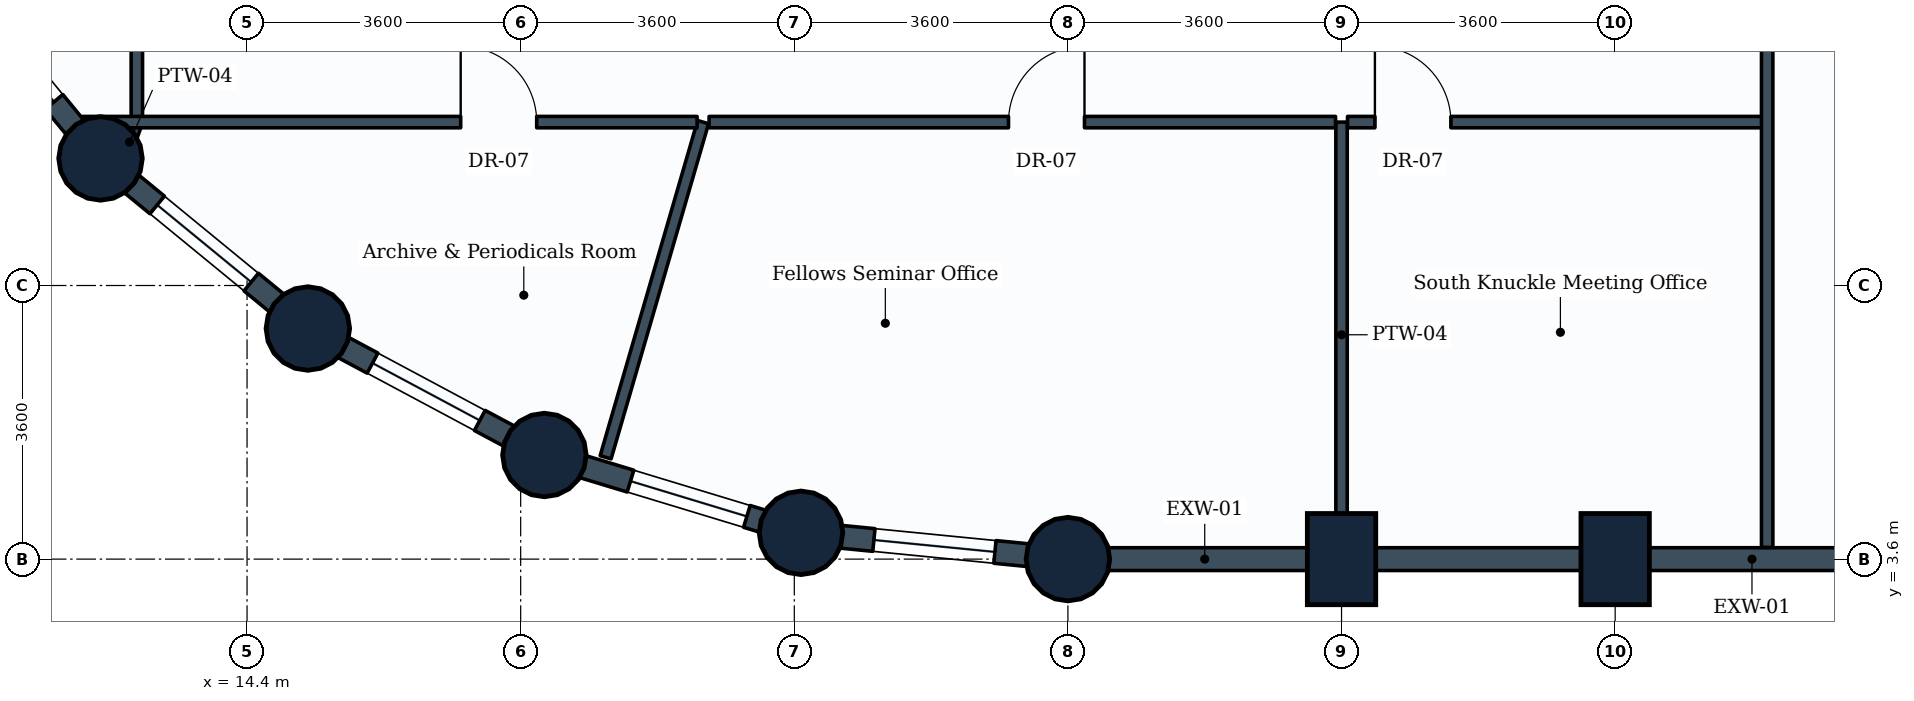
"""IFC4 building model, lengths in metres.
Left out: names, types, materials, properties, quantities, classifications, styles, units other than length and angle.
Written with IfcOpenShell. Run it as: python <this file> out.ifc"""

import sys

from ifc_helpers import new_model, si_unit, direction, frame, frame_2d, origin, origin_2d, place, context, subcontext, project, spatial, rectangle, circle, extrude, element, fill, save


model = new_model("IFC4")
c1 = context("Model", 3, precision=1e-05, world=origin(), true_north=direction((0.0, 1.0)))
c2 = subcontext(c1, "Body", "Model", "MODEL_VIEW")
j1 = project(units=[si_unit("LENGTHUNIT", "METRE"), si_unit("PLANEANGLEUNIT", "RADIAN")], contexts=[c1])
p1 = place(None, origin())
s1 = spatial("IfcSite", under=j1, at=p1, CompositionType="ELEMENT")
p2 = place(p1, origin())
s2 = spatial("IfcBuilding", under=s1, at=p2, CompositionType="ELEMENT")
p3 = place(p2, frame((0.0, 0.0, 35.7)))
s3 = spatial("IfcBuildingStorey", under=s2, at=p3, CompositionType="ELEMENT", Elevation=35.7)
for number, where, z_axis, x_axis in (
    (1, (12.472, 8.872, 0.0), (0.0, 0.0, 1.0), (1.0, 0.0, 0.0)),
    (2, (15.2, 6.634, 0.0), (0.0, 0.0, 1.0), (1.0, 0.0, 0.0)),
    (3, (18.312, 4.97, 0.0), (0.0, 0.0, 1.0), (1.0, 0.0, 0.0)),
    (4, (21.688, 3.946, 0.0), (0.0, 0.0, 1.0), (1.0, 0.0, 0.0)),
    (5, (25.2, 3.6, 0.0), (0.0, 0.0, 1.0), (1.0, 0.0, 0.0)),
):
    element("IfcColumn", number, at=place(p3, frame(where, z_axis=z_axis, x_axis=x_axis)), inside=s3, PredefinedType="COLUMN", context=c2, shape_type="SweptSolid", body=[
        extrude(circle(Radius=0.55, at=origin_2d()), origin(), (0.0, 0.0, 1.0), 3.9),
    ])
for number, where, z_axis, x_axis in (
    (6, (28.8, 3.6, 0.0), (0.0, 0.0, 1.0), (1.0, 0.0, 0.0)),
    (7, (32.4, 3.6, 0.0), (0.0, 0.0, 1.0), (1.0, 0.0, 0.0)),
):
    element("IfcColumn", number, at=place(p3, frame(where, z_axis=z_axis, x_axis=x_axis)), inside=s3, PredefinedType="COLUMN", context=c2, shape_type="SweptSolid", body=[
        extrude(rectangle(XDim=0.9, YDim=1.2, at=origin_2d()), origin(), (0.0, 0.0, 1.0), 3.9),
    ])
p4 = place(p3, frame((28.8, 3.6, 0.0), z_axis=(0.0, 0.0, 1.0), x_axis=(-1.0, 0.0, 0.0)))
e8 = element("IfcWall", 8, at=p4, inside=s3, PredefinedType="STANDARD", context=c2, shape_type="SweptSolid", body=[
    extrude(rectangle(XDim=3.6, YDim=0.3, at=frame_2d((1.8, 0.0))), origin(), (0.0, 0.0, 1.0), 2.93),
])
p5 = place(p3, frame((32.4, 3.6, 0.0), z_axis=(0.0, 0.0, 1.0), x_axis=(-1.0, 0.0, 0.0)))
e9 = element("IfcWall", 9, at=p5, inside=s3, PredefinedType="STANDARD", context=c2, shape_type="SweptSolid", body=[
    extrude(rectangle(XDim=3.6, YDim=0.3, at=frame_2d((1.8, 0.0))), origin(), (0.0, 0.0, 1.0), 2.93),
])
p6 = place(p3, frame((36.0, 3.6, 0.0), z_axis=(0.0, 0.0, 1.0), x_axis=(-1.0, 0.0, 0.0)))
e10 = element("IfcWall", 10, at=p6, inside=s3, PredefinedType="STANDARD", context=c2, shape_type="SweptSolid", body=[
    extrude(rectangle(XDim=3.6, YDim=0.3, at=frame_2d((1.8, 0.0))), origin(), (0.0, 0.0, 1.0), 2.93),
])
p7 = place(p3, frame((12.472, 8.872, 0.0), z_axis=(0.0, 0.0, 1.0), x_axis=(-0.634258295121, 0.773121216285, 0.0)))
e11 = element("IfcWall", 11, at=p7, inside=s3, PredefinedType="STANDARD", context=c2, shape_type="SweptSolid", body=[
    extrude(rectangle(XDim=3.529, YDim=0.3, at=frame_2d((1.764, 0.0))), origin(), (0.0, 0.0, 1.0), 2.93),
])
p8 = place(p7, frame((0.964, 0.0, 0.85)))
e12 = element("IfcOpeningElement", 12, at=p8, cuts=e11, PredefinedType="OPENING", context=c2, shape_type="SweptSolid", body=[
    extrude(rectangle(XDim=1.6, YDim=1.35, at=frame_2d((0.8, 0.675))), frame((0.0, 0.16, 0.0), z_axis=(0.0, -1.0, 0.0), x_axis=(1.0, 0.0, 0.0)), (0.0, 0.0, 1.0), 0.32),
])
p9 = place(p3, frame((15.2, 6.634, 0.0), z_axis=(0.0, 0.0, 1.0), x_axis=(-0.773121216285, 0.634258295121, 0.0)))
e13 = element("IfcWall", 13, at=p9, inside=s3, PredefinedType="STANDARD", context=c2, shape_type="SweptSolid", body=[
    extrude(rectangle(XDim=3.529, YDim=0.3, at=frame_2d((1.764, 0.0))), origin(), (0.0, 0.0, 1.0), 2.93),
])
p10 = place(p9, frame((0.964, 0.0, 0.85)))
e14 = element("IfcOpeningElement", 14, at=p10, cuts=e13, PredefinedType="OPENING", context=c2, shape_type="SweptSolid", body=[
    extrude(rectangle(XDim=1.6, YDim=1.35, at=frame_2d((0.8, 0.675))), frame((0.0, 0.16, 0.0), z_axis=(0.0, -1.0, 0.0), x_axis=(1.0, 0.0, 0.0)), (0.0, 0.0, 1.0), 0.32),
])
p11 = place(p3, frame((18.312, 4.97, 0.0), z_axis=(0.0, 0.0, 1.0), x_axis=(-0.881846862014, 0.471535907389, 0.0)))
e15 = element("IfcWall", 15, at=p11, inside=s3, PredefinedType="STANDARD", context=c2, shape_type="SweptSolid", body=[
    extrude(rectangle(XDim=3.529, YDim=0.3, at=frame_2d((1.765, 0.0))), origin(), (0.0, 0.0, 1.0), 2.93),
])
p12 = place(p11, frame((0.964, 0.0, 0.85)))
e16 = element("IfcOpeningElement", 16, at=p12, cuts=e15, PredefinedType="OPENING", context=c2, shape_type="SweptSolid", body=[
    extrude(rectangle(XDim=1.6, YDim=1.35, at=frame_2d((0.8, 0.675))), frame((0.0, 0.16, 0.0), z_axis=(0.0, -1.0, 0.0), x_axis=(1.0, 0.0, 0.0)), (0.0, 0.0, 1.0), 0.32),
])
p13 = place(p3, frame((21.688, 3.946, 0.0), z_axis=(0.0, 0.0, 1.0), x_axis=(-0.956953367403, 0.290241714123, 0.0)))
e17 = element("IfcWall", 17, at=p13, inside=s3, PredefinedType="STANDARD", context=c2, shape_type="SweptSolid", body=[
    extrude(rectangle(XDim=3.528, YDim=0.3, at=frame_2d((1.764, 0.0))), origin(), (0.0, 0.0, 1.0), 2.93),
])
p14 = place(p13, frame((0.744, 0.0, 0.85)))
e18 = element("IfcOpeningElement", 18, at=p14, cuts=e17, PredefinedType="OPENING", context=c2, shape_type="SweptSolid", body=[
    extrude(rectangle(XDim=1.6, YDim=1.35, at=frame_2d((0.8, 0.675))), frame((0.0, 0.16, 0.0), z_axis=(0.0, -1.0, 0.0), x_axis=(1.0, 0.0, 0.0)), (0.0, 0.0, 1.0), 0.32),
])
p15 = place(p3, frame((25.2, 3.6, 0.0), z_axis=(0.0, 0.0, 1.0), x_axis=(-0.995183369056, 0.098030923459, 0.0)))
e19 = element("IfcWall", 19, at=p15, inside=s3, PredefinedType="STANDARD", context=c2, shape_type="SweptSolid", body=[
    extrude(rectangle(XDim=3.529, YDim=0.3, at=frame_2d((1.765, 0.0))), origin(), (0.0, 0.0, 1.0), 2.93),
])
p16 = place(p15, frame((0.965, 0.0, 0.85)))
e20 = element("IfcOpeningElement", 20, at=p16, cuts=e19, PredefinedType="OPENING", context=c2, shape_type="SweptSolid", body=[
    extrude(rectangle(XDim=1.6, YDim=1.35, at=frame_2d((0.8, 0.675))), frame((0.0, 0.16, 0.0), z_axis=(0.0, -1.0, 0.0), x_axis=(1.0, 0.0, 0.0)), (0.0, 0.0, 1.0), 0.32),
])
p17 = place(p3, frame((28.8, 9.35, 0.0), z_axis=(0.0, 0.0, 1.0), x_axis=(0.0, -1.0, 0.0)))
e21 = element("IfcWall", 21, at=p17, inside=s3, PredefinedType="PARTITIONING", context=c2, shape_type="SweptSolid", body=[
    extrude(rectangle(XDim=5.596, YDim=0.15, at=frame_2d((2.798, 0.0))), origin(), (0.0, 0.0, 1.0), 3.635),
])
p18 = place(p3, frame((12.95, 9.35, 0.0), z_axis=(0.0, 0.0, 1.0), x_axis=(-0.341918365566, -0.939729658619, 0.0)))
e22 = element("IfcWall", 22, at=p18, inside=s3, PredefinedType="PARTITIONING", context=c2, shape_type="SweptSolid", body=[
    extrude(rectangle(XDim=0.559, YDim=0.15, at=frame_2d((0.28, 0.0))), origin(), (0.0, 0.0, 1.0), 2.93),
])
p19 = place(p3, frame((20.4, 9.35, 0.0), z_axis=(0.0, 0.0, 1.0), x_axis=(-0.279120135734, -0.960256189685, 0.0)))
e23 = element("IfcWall", 23, at=p19, inside=s3, PredefinedType="PARTITIONING", context=c2, shape_type="SweptSolid", body=[
    extrude(rectangle(XDim=4.593, YDim=0.15, at=frame_2d((2.296, 0.0))), origin(), (0.0, 0.0, 1.0), 2.93),
])
p20 = place(p3, frame((12.95, 9.35, 0.0), z_axis=(0.0, 0.0, 1.0), x_axis=(0.0, 1.0, 0.0)))
e24 = element("IfcWall", 24, at=p20, inside=s3, PredefinedType="PARTITIONING", context=c2, shape_type="SweptSolid", body=[
    extrude(rectangle(XDim=7.371, YDim=0.15, at=frame_2d((3.686, 0.0))), origin(), (0.0, 0.0, 1.0), 3.04),
])
p21 = place(p20, frame((4.261, 0.0, 0.0)))
e25 = element("IfcOpeningElement", 25, at=p21, cuts=e24, PredefinedType="OPENING", context=c2, shape_type="SweptSolid", body=[
    extrude(rectangle(XDim=1.0, YDim=2.1, at=frame_2d((0.5, 1.05))), frame((0.0, 0.085, 0.0), z_axis=(0.0, -1.0, 0.0), x_axis=(1.0, 0.0, 0.0)), (0.0, 0.0, 1.0), 0.17),
])
p22 = place(p3, frame((12.234, 9.35, 0.0), z_axis=(0.0, 0.0, 1.0), x_axis=(1.0, 0.0, 0.0)))
e26 = element("IfcWall", 26, at=p22, inside=s3, PredefinedType="PARTITIONING", context=c2, shape_type="SweptSolid", body=[
    extrude(rectangle(XDim=8.087, YDim=0.15, at=frame_2d((4.043, 0.0))), origin(), (0.0, 0.0, 1.0), 2.93),
])
p23 = place(p22, frame((4.977, 0.0, 0.0)))
e27 = element("IfcOpeningElement", 27, at=p23, cuts=e26, PredefinedType="OPENING", context=c2, shape_type="SweptSolid", body=[
    extrude(rectangle(XDim=1.0, YDim=2.1, at=frame_2d((0.5, 1.05))), frame((0.0, 0.085, 0.0), z_axis=(0.0, -1.0, 0.0), x_axis=(1.0, 0.0, 0.0)), (0.0, 0.0, 1.0), 0.17),
])
p24 = place(p3, frame((20.479, 9.35, 0.0), z_axis=(0.0, 0.0, 1.0), x_axis=(1.0, 0.0, 0.0)))
e28 = element("IfcWall", 28, at=p24, inside=s3, PredefinedType="PARTITIONING", context=c2, shape_type="SweptSolid", body=[
    extrude(rectangle(XDim=8.242, YDim=0.15, at=frame_2d((4.121, 0.0))), origin(), (0.0, 0.0, 1.0), 3.08),
])
p25 = place(p24, frame((3.939, 0.0, 0.0)))
e29 = element("IfcOpeningElement", 29, at=p25, cuts=e28, PredefinedType="OPENING", context=c2, shape_type="SweptSolid", body=[
    extrude(rectangle(XDim=1.0, YDim=2.1, at=frame_2d((0.5, 1.05))), frame((0.0, 0.085, 0.0), z_axis=(0.0, -1.0, 0.0), x_axis=(1.0, 0.0, 0.0)), (0.0, 0.0, 1.0), 0.17),
])
p26 = place(p3, frame((28.879, 9.35, 0.0), z_axis=(0.0, 0.0, 1.0), x_axis=(1.0, 0.0, 0.0)))
e30 = element("IfcWall", 30, at=p26, inside=s3, PredefinedType="PARTITIONING", context=c2, shape_type="SweptSolid", body=[
    extrude(rectangle(XDim=5.521, YDim=0.15, at=frame_2d((2.76, 0.0))), origin(), (0.0, 0.0, 1.0), 3.635),
])
p27 = place(p26, frame((0.36, 0.0, 0.0)))
e31 = element("IfcOpeningElement", 31, at=p27, cuts=e30, PredefinedType="OPENING", context=c2, shape_type="SweptSolid", body=[
    extrude(rectangle(XDim=1.0, YDim=2.1, at=frame_2d((0.5, 1.05))), frame((0.0, 0.085, 0.0), z_axis=(0.0, -1.0, 0.0), x_axis=(1.0, 0.0, 0.0)), (0.0, 0.0, 1.0), 0.17),
])
p28 = place(p3, frame((34.4, 3.754, 0.0), z_axis=(0.0, 0.0, 1.0), x_axis=(0.0, 1.0, 0.0)))
e32 = element("IfcWall", 32, at=p28, inside=s3, PredefinedType="PARTITIONING", context=c2, shape_type="SweptSolid", body=[
    extrude(rectangle(XDim=12.546, YDim=0.15, at=frame_2d((6.273, 0.0))), origin(), (0.0, 0.0, 1.0), 2.93),
])
p29 = place(p8, origin())
e33 = element("IfcWindow", 33, at=p29, inside=s3, PartitioningType="SINGLE_PANEL", PredefinedType="WINDOW", context=c2, shape_type="SweptSolid", body=[
    extrude(rectangle(XDim=1.6, YDim=1.35, at=frame_2d((0.8, 0.675))), frame((0.0, 0.03, 0.0), z_axis=(0.0, -1.0, 0.0), x_axis=(1.0, 0.0, 0.0)), (0.0, 0.0, 1.0), 0.06),
])
fill(e12, e33)
p30 = place(p10, origin())
e34 = element("IfcWindow", 34, at=p30, inside=s3, PartitioningType="SINGLE_PANEL", PredefinedType="WINDOW", context=c2, shape_type="SweptSolid", body=[
    extrude(rectangle(XDim=1.6, YDim=1.35, at=frame_2d((0.8, 0.675))), frame((0.0, 0.03, 0.0), z_axis=(0.0, -1.0, 0.0), x_axis=(1.0, 0.0, 0.0)), (0.0, 0.0, 1.0), 0.06),
])
fill(e14, e34)
p31 = place(p12, origin())
e35 = element("IfcWindow", 35, at=p31, inside=s3, PartitioningType="SINGLE_PANEL", PredefinedType="WINDOW", context=c2, shape_type="SweptSolid", body=[
    extrude(rectangle(XDim=1.6, YDim=1.35, at=frame_2d((0.8, 0.675))), frame((0.0, 0.03, 0.0), z_axis=(0.0, -1.0, 0.0), x_axis=(1.0, 0.0, 0.0)), (0.0, 0.0, 1.0), 0.06),
])
fill(e16, e35)
p32 = place(p14, origin())
e36 = element("IfcWindow", 36, at=p32, inside=s3, PartitioningType="SINGLE_PANEL", PredefinedType="WINDOW", context=c2, shape_type="SweptSolid", body=[
    extrude(rectangle(XDim=1.6, YDim=1.35, at=frame_2d((0.8, 0.675))), frame((0.0, 0.03, 0.0), z_axis=(0.0, -1.0, 0.0), x_axis=(1.0, 0.0, 0.0)), (0.0, 0.0, 1.0), 0.06),
])
fill(e18, e36)
p33 = place(p16, origin())
e37 = element("IfcWindow", 37, at=p33, inside=s3, PartitioningType="SINGLE_PANEL", PredefinedType="WINDOW", context=c2, shape_type="SweptSolid", body=[
    extrude(rectangle(XDim=1.6, YDim=1.35, at=frame_2d((0.8, 0.675))), frame((0.0, 0.03, 0.0), z_axis=(0.0, -1.0, 0.0), x_axis=(1.0, 0.0, 0.0)), (0.0, 0.0, 1.0), 0.06),
])
fill(e20, e37)
p34 = place(p23, origin())
e38 = element("IfcDoor", 38, at=p34, inside=s3, OperationType="SINGLE_SWING_LEFT", PredefinedType="DOOR", context=c2, shape_type="SweptSolid", body=[
    extrude(rectangle(XDim=1.0, YDim=2.1, at=frame_2d((0.5, 1.05))), frame((0.0, 0.025, 0.0), z_axis=(0.0, -1.0, 0.0), x_axis=(1.0, 0.0, 0.0)), (0.0, 0.0, 1.0), 0.05),
])
fill(e27, e38)
p35 = place(p25, origin())
e39 = element("IfcDoor", 39, at=p35, inside=s3, OperationType="SINGLE_SWING_RIGHT", PredefinedType="DOOR", context=c2, shape_type="SweptSolid", body=[
    extrude(rectangle(XDim=1.0, YDim=2.1, at=frame_2d((0.5, 1.05))), frame((0.0, 0.025, 0.0), z_axis=(0.0, -1.0, 0.0), x_axis=(1.0, 0.0, 0.0)), (0.0, 0.0, 1.0), 0.05),
])
fill(e29, e39)
p36 = place(p27, origin())
e40 = element("IfcDoor", 40, at=p36, inside=s3, OperationType="SINGLE_SWING_LEFT", PredefinedType="DOOR", context=c2, shape_type="SweptSolid", body=[
    extrude(rectangle(XDim=1.0, YDim=2.1, at=frame_2d((0.5, 1.05))), frame((0.0, 0.025, 0.0), z_axis=(0.0, -1.0, 0.0), x_axis=(1.0, 0.0, 0.0)), (0.0, 0.0, 1.0), 0.05),
])
fill(e31, e40)
save(model, sys.argv[1])
